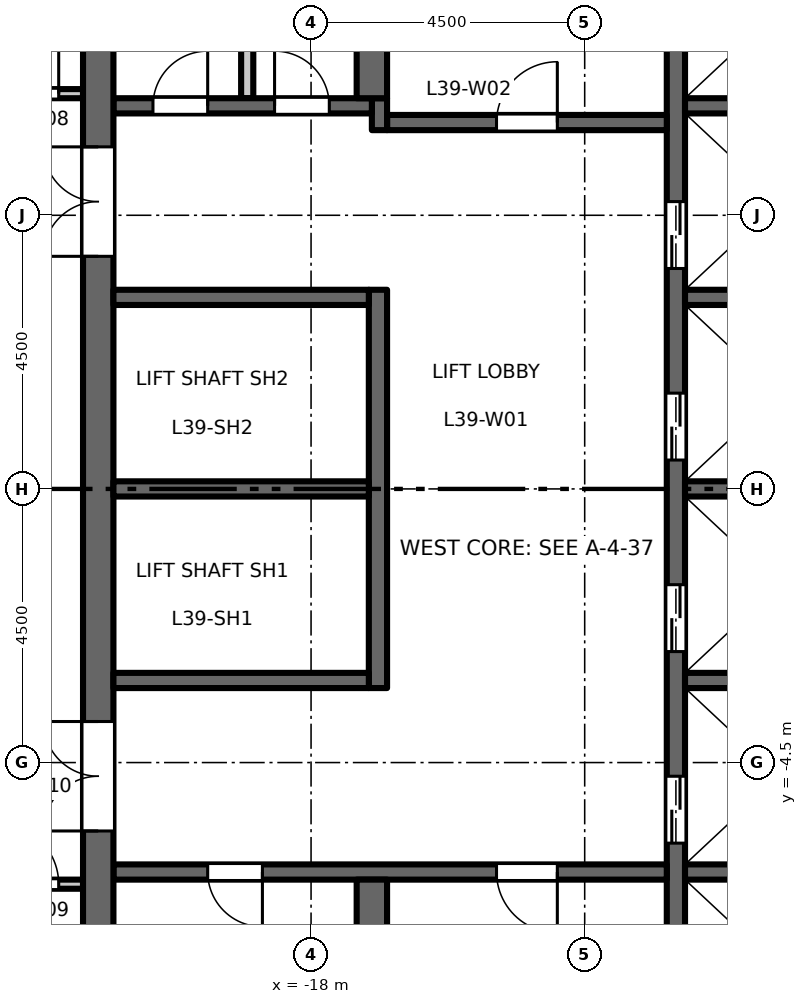
"""IFC4 building model, lengths in metres.
Left out: names, types, materials, properties, quantities, classifications, styles, units other than length and angle.
Written with IfcOpenShell. Run it as: python <this file> out.ifc"""

import sys

from ifc_helpers import new_model, si_unit, direction, frame, frame_2d, origin, place, context, subcontext, project, spatial, rectangle, extrude, element, fill, save


model = new_model("IFC4")
c1 = context("Model", 3, precision=1e-05, world=origin(), true_north=direction((0.0, 1.0)))
c2 = subcontext(c1, "Body", "Model", "MODEL_VIEW")
j1 = project(units=[si_unit("LENGTHUNIT", "METRE"), si_unit("PLANEANGLEUNIT", "RADIAN")], contexts=[c1])
p1 = place(None, origin())
s1 = spatial("IfcSite", under=j1, at=p1, CompositionType="ELEMENT")
p2 = place(p1, origin())
s2 = spatial("IfcBuilding", under=s1, at=p2, CompositionType="ELEMENT")
p3 = place(p2, frame((0.0, 0.0, 181.2)))
s3 = spatial("IfcBuildingStorey", under=s2, at=p3, CompositionType="ELEMENT", Elevation=181.2)
p4 = place(p3, frame((-12.0, -9.45, 0.0), z_axis=(0.0, 0.0, 1.0), x_axis=(0.0, 1.0, 0.0)))
e1 = element("IfcWall", 1, at=p4, inside=s3, PredefinedType="SHEAR", context=c2, shape_type="SweptSolid", body=[
    extrude(rectangle(XDim=18.9, YDim=0.3, at=frame_2d((9.45, 0.0))), origin(), (0.0, 0.0, 1.0), 5.8),
])
p5 = place(p4, frame((3.625, 0.0, 0.0)))
e2 = element("IfcOpeningElement", 2, at=p5, cuts=e1, PredefinedType="OPENING", context=c2, shape_type="SweptSolid", body=[
    extrude(rectangle(XDim=1.1, YDim=2.1, at=frame_2d((0.55, 1.05))), frame((0.0, 0.16, 0.0), z_axis=(0.0, -1.0, 0.0), x_axis=(1.0, 0.0, 0.0)), (0.0, 0.0, 1.0), 0.32),
])
p6 = place(p4, frame((6.775, 0.0, 0.0)))
e3 = element("IfcOpeningElement", 3, at=p6, cuts=e1, PredefinedType="OPENING", context=c2, shape_type="SweptSolid", body=[
    extrude(rectangle(XDim=1.1, YDim=2.1, at=frame_2d((0.55, 1.05))), frame((0.0, 0.16, 0.0), z_axis=(0.0, -1.0, 0.0), x_axis=(1.0, 0.0, 0.0)), (0.0, 0.0, 1.0), 0.32),
])
p7 = place(p4, frame((9.925, 0.0, 0.0)))
e4 = element("IfcOpeningElement", 4, at=p7, cuts=e1, PredefinedType="OPENING", context=c2, shape_type="SweptSolid", body=[
    extrude(rectangle(XDim=1.1, YDim=2.1, at=frame_2d((0.55, 1.05))), frame((0.0, 0.16, 0.0), z_axis=(0.0, -1.0, 0.0), x_axis=(1.0, 0.0, 0.0)), (0.0, 0.0, 1.0), 0.32),
])
p8 = place(p4, frame((13.075, 0.0, 0.0)))
e5 = element("IfcOpeningElement", 5, at=p8, cuts=e1, PredefinedType="OPENING", context=c2, shape_type="SweptSolid", body=[
    extrude(rectangle(XDim=1.1, YDim=2.1, at=frame_2d((0.55, 1.05))), frame((0.0, 0.16, 0.0), z_axis=(0.0, -1.0, 0.0), x_axis=(1.0, 0.0, 0.0)), (0.0, 0.0, 1.0), 0.32),
])
p9 = place(p4, frame((16.725, 0.0, 0.0)))
e6 = element("IfcOpeningElement", 6, at=p9, cuts=e1, PredefinedType="OPENING", context=c2, shape_type="SweptSolid", body=[
    extrude(rectangle(XDim=1.2, YDim=2.1, at=frame_2d((0.6, 1.05))), frame((0.0, 0.16, 0.0), z_axis=(0.0, -1.0, 0.0), x_axis=(1.0, 0.0, 0.0)), (0.0, 0.0, 1.0), 0.32),
])
p10 = place(p4, frame((0.975, 0.0, 0.0)))
e7 = element("IfcOpeningElement", 7, at=p10, cuts=e1, PredefinedType="OPENING", context=c2, shape_type="SweptSolid", body=[
    extrude(rectangle(XDim=1.2, YDim=2.1, at=frame_2d((0.6, 1.05))), frame((0.0, 0.16, 0.0), z_axis=(0.0, -1.0, 0.0), x_axis=(1.0, 0.0, 0.0)), (0.0, 0.0, 1.0), 0.32),
])
p11 = place(p3, frame((-12.15, 6.025, 0.0), z_axis=(0.0, 0.0, 1.0), x_axis=(-1.0, 0.0, 0.0)))
e8 = element("IfcWall", 8, at=p11, inside=s3, PredefinedType="SHEAR", context=c2, shape_type="SweptSolid", body=[
    extrude(rectangle(XDim=4.6, YDim=0.25, at=frame_2d((2.3, 0.0))), origin(), (0.0, 0.0, 1.0), 5.8),
])
p12 = place(p11, frame((1.8, 0.0, 0.0)))
e9 = element("IfcOpeningElement", 9, at=p12, cuts=e8, PredefinedType="OPENING", context=c2, shape_type="SweptSolid", body=[
    extrude(rectangle(XDim=1.0, YDim=2.1, at=frame_2d((0.5, 1.05))), frame((0.0, 0.135, 0.0), z_axis=(0.0, -1.0, 0.0), x_axis=(1.0, 0.0, 0.0)), (0.0, 0.0, 1.0), 0.27),
])
p13 = place(p3, frame((-16.875, 5.9, 0.0), z_axis=(0.0, 0.0, 1.0), x_axis=(0.0, 1.0, 0.0)))
e10 = element("IfcWall", 10, at=p13, inside=s3, PredefinedType="SHEAR", context=c2, shape_type="SweptSolid", body=[
    extrude(rectangle(XDim=0.525, YDim=0.25, at=frame_2d((0.263, 0.0))), origin(), (0.0, 0.0, 1.0), 5.8),
])
p14 = place(p3, frame((-17.0, 6.3, 0.0), z_axis=(0.0, 0.0, 1.0), x_axis=(-1.0, 0.0, 0.0)))
e11 = element("IfcWall", 11, at=p14, inside=s3, PredefinedType="SHEAR", context=c2, shape_type="SweptSolid", body=[
    extrude(rectangle(XDim=4.25, YDim=0.25, at=frame_2d((2.125, 0.0))), origin(), (0.0, 0.0, 1.0), 5.8),
])
p15 = place(p14, frame((0.7, 0.0, 0.0)))
e12 = element("IfcOpeningElement", 12, at=p15, cuts=e11, PredefinedType="OPENING", context=c2, shape_type="SweptSolid", body=[
    extrude(rectangle(XDim=0.9, YDim=2.1, at=frame_2d((0.45, 1.05))), frame((0.0, 0.135, 0.0), z_axis=(0.0, -1.0, 0.0), x_axis=(1.0, 0.0, 0.0)), (0.0, 0.0, 1.0), 0.27),
])
p16 = place(p14, frame((2.7, 0.0, 0.0)))
e13 = element("IfcOpeningElement", 13, at=p16, cuts=e11, PredefinedType="OPENING", context=c2, shape_type="SweptSolid", body=[
    extrude(rectangle(XDim=0.9, YDim=2.1, at=frame_2d((0.45, 1.05))), frame((0.0, 0.135, 0.0), z_axis=(0.0, -1.0, 0.0), x_axis=(1.0, 0.0, 0.0)), (0.0, 0.0, 1.0), 0.27),
])
p17 = place(p3, frame((-12.15, -6.3, 0.0), z_axis=(0.0, 0.0, 1.0), x_axis=(-1.0, 0.0, 0.0)))
e14 = element("IfcWall", 14, at=p17, inside=s3, PredefinedType="SHEAR", context=c2, shape_type="SweptSolid", body=[
    extrude(rectangle(XDim=9.1, YDim=0.25, at=frame_2d((4.55, 0.0))), origin(), (0.0, 0.0, 1.0), 5.8),
])
p18 = place(p17, frame((1.8, 0.0, 0.0)))
e15 = element("IfcOpeningElement", 15, at=p18, cuts=e14, PredefinedType="OPENING", context=c2, shape_type="SweptSolid", body=[
    extrude(rectangle(XDim=1.0, YDim=2.1, at=frame_2d((0.5, 1.05))), frame((0.0, 0.135, 0.0), z_axis=(0.0, -1.0, 0.0), x_axis=(1.0, 0.0, 0.0)), (0.0, 0.0, 1.0), 0.27),
])
p19 = place(p17, frame((6.65, 0.0, 0.0)))
e16 = element("IfcOpeningElement", 16, at=p19, cuts=e14, PredefinedType="OPENING", context=c2, shape_type="SweptSolid", body=[
    extrude(rectangle(XDim=0.9, YDim=2.1, at=frame_2d((0.45, 1.05))), frame((0.0, 0.135, 0.0), z_axis=(0.0, -1.0, 0.0), x_axis=(1.0, 0.0, 0.0)), (0.0, 0.0, 1.0), 0.27),
])
p20 = place(p3, frame((-21.5, -13.0, 0.0), z_axis=(0.0, 0.0, 1.0), x_axis=(0.0, 1.0, 0.0)))
e17 = element("IfcWall", 17, at=p20, inside=s3, PredefinedType="SHEAR", context=c2, shape_type="SweptSolid", body=[
    extrude(rectangle(XDim=26.0, YDim=0.5, at=frame_2d((13.0, 0.0))), origin(), (0.0, 0.0, 1.0), 5.8),
])
p21 = place(p20, frame((16.825, 0.0, 0.0)))
e18 = element("IfcOpeningElement", 18, at=p21, cuts=e17, PredefinedType="OPENING", context=c2, shape_type="SweptSolid", body=[
    extrude(rectangle(XDim=1.8, YDim=2.1, at=frame_2d((0.9, 1.05))), frame((0.0, 0.26, 0.0), z_axis=(0.0, -1.0, 0.0), x_axis=(1.0, 0.0, 0.0)), (0.0, 0.0, 1.0), 0.52),
])
p22 = place(p20, frame((7.375, 0.0, 0.0)))
e19 = element("IfcOpeningElement", 19, at=p22, cuts=e17, PredefinedType="OPENING", context=c2, shape_type="SweptSolid", body=[
    extrude(rectangle(XDim=1.8, YDim=2.1, at=frame_2d((0.9, 1.05))), frame((0.0, 0.26, 0.0), z_axis=(0.0, -1.0, 0.0), x_axis=(1.0, 0.0, 0.0)), (0.0, 0.0, 1.0), 0.52),
])
p23 = place(p3, frame((-19.05, 6.425, 0.0), z_axis=(0.0, 0.0, 1.0), x_axis=(0.0, 1.0, 0.0)))
e20 = element("IfcWall", 20, at=p23, inside=s3, PredefinedType="PARTITIONING", context=c2, shape_type="SweptSolid", body=[
    extrude(rectangle(XDim=6.575, YDim=0.2, at=frame_2d((3.288, 0.0))), origin(), (0.0, 0.0, 1.0), 5.8),
])
p24 = place(p3, frame((-16.9, -3.275, 0.0), z_axis=(0.0, 0.0, 1.0), x_axis=(0.0, 1.0, 0.0)))
e21 = element("IfcWall", 21, at=p24, inside=s3, PredefinedType="SHEAR", context=c2, shape_type="SweptSolid", body=[
    extrude(rectangle(XDim=6.55, YDim=0.3, at=frame_2d((3.275, 0.0))), origin(), (0.0, 0.0, 1.0), 5.8),
])
for number, where, z_axis, x_axis in (
    (22, (-17.05, 0.0, 0.0), (0.0, 0.0, 1.0), (-1.0, 0.0, 0.0)),
    (23, (-17.05, 3.15, 0.0), (0.0, 0.0, 1.0), (-1.0, 0.0, 0.0)),
    (24, (-17.05, -3.15, 0.0), (0.0, 0.0, 1.0), (-1.0, 0.0, 0.0)),
):
    element("IfcWall", number, at=place(p3, frame(where, z_axis=z_axis, x_axis=x_axis)), inside=s3, PredefinedType="SHEAR", context=c2, shape_type="SweptSolid", body=[
        extrude(rectangle(XDim=4.2, YDim=0.25, at=frame_2d((2.1, 0.0))), origin(), (0.0, 0.0, 1.0), 5.8),
    ])
for number, where, z_axis, x_axis in (
    (25, (-17.0, 6.425, 0.0), (0.0, 0.0, 1.0), (0.0, 1.0, 0.0)),
    (26, (-17.0, -13.0, 0.0), (0.0, 0.0, 1.0), (0.0, 1.0, 0.0)),
):
    element("IfcWall", number, at=place(p3, frame(where, z_axis=z_axis, x_axis=x_axis)), inside=s3, PredefinedType="SHEAR", context=c2, shape_type="SweptSolid", body=[
        extrude(rectangle(XDim=6.575, YDim=0.5, at=frame_2d((3.288, 0.0))), origin(), (0.0, 0.0, 1.0), 5.8),
    ])
for number, where, z_axis, x_axis in (
    (27, (-8.75, 0.0, 0.0), (0.0, 0.0, 1.0), (-1.0, 0.0, 0.0)),
    (28, (-8.75, 3.15, 0.0), (0.0, 0.0, 1.0), (-1.0, 0.0, 0.0)),
    (29, (-8.75, 6.3, 0.0), (0.0, 0.0, 1.0), (-1.0, 0.0, 0.0)),
    (30, (-8.75, -3.15, 0.0), (0.0, 0.0, 1.0), (-1.0, 0.0, 0.0)),
    (31, (-8.75, -6.3, 0.0), (0.0, 0.0, 1.0), (-1.0, 0.0, 0.0)),
):
    element("IfcWall", number, at=place(p3, frame(where, z_axis=z_axis, x_axis=x_axis)), inside=s3, PredefinedType="SHEAR", context=c2, shape_type="SweptSolid", body=[
        extrude(rectangle(XDim=3.1, YDim=0.25, at=frame_2d((1.55, 0.0))), origin(), (0.0, 0.0, 1.0), 5.8),
    ])
p25 = place(p3, frame((-26.325, -6.5, 0.0), z_axis=(0.0, 0.0, 1.0), x_axis=(1.0, 0.0, 0.0)))
e32 = element("IfcWall", 32, at=p25, inside=s3, PredefinedType="PARTITIONING", context=c2, shape_type="SweptSolid", body=[
    extrude(rectangle(XDim=4.575, YDim=0.15, at=frame_2d((2.288, 0.0))), origin(), (0.0, 0.0, 1.0), 5.8),
])
p26 = place(p25, frame((3.175, 0.0, 0.0)))
e33 = element("IfcOpeningElement", 33, at=p26, cuts=e32, PredefinedType="OPENING", context=c2, shape_type="SweptSolid", body=[
    extrude(rectangle(XDim=1.0, YDim=2.1, at=frame_2d((0.5, 1.05))), frame((0.0, 0.085, 0.0), z_axis=(0.0, -1.0, 0.0), x_axis=(1.0, 0.0, 0.0)), (0.0, 0.0, 1.0), 0.17),
])
p27 = place(p3, frame((-26.325, 6.5, 0.0), z_axis=(0.0, 0.0, 1.0), x_axis=(1.0, 0.0, 0.0)))
e34 = element("IfcWall", 34, at=p27, inside=s3, PredefinedType="PARTITIONING", context=c2, shape_type="SweptSolid", body=[
    extrude(rectangle(XDim=4.575, YDim=0.15, at=frame_2d((2.288, 0.0))), origin(), (0.0, 0.0, 1.0), 5.8),
])
p28 = place(p27, frame((3.175, 0.0, 0.0)))
e35 = element("IfcOpeningElement", 35, at=p28, cuts=e34, PredefinedType="OPENING", context=c2, shape_type="SweptSolid", body=[
    extrude(rectangle(XDim=1.0, YDim=2.1, at=frame_2d((0.5, 1.05))), frame((0.0, 0.085, 0.0), z_axis=(0.0, -1.0, 0.0), x_axis=(1.0, 0.0, 0.0)), (0.0, 0.0, 1.0), 0.17),
])
p29 = place(p12, origin())
e36 = element("IfcDoor", 36, at=p29, inside=s3, OperationType="SINGLE_SWING_LEFT", PredefinedType="DOOR", context=c2, shape_type="SweptSolid", body=[
    extrude(rectangle(XDim=1.0, YDim=2.1, at=frame_2d((0.5, 1.05))), frame((0.0, 0.025, 0.0), z_axis=(0.0, -1.0, 0.0), x_axis=(1.0, 0.0, 0.0)), (0.0, 0.0, 1.0), 0.05),
])
fill(e9, e36)
p30 = place(p18, origin())
e37 = element("IfcDoor", 37, at=p30, inside=s3, OperationType="SINGLE_SWING_RIGHT", PredefinedType="DOOR", context=c2, shape_type="SweptSolid", body=[
    extrude(rectangle(XDim=1.0, YDim=2.1, at=frame_2d((0.5, 1.05))), frame((0.0, 0.025, 0.0), z_axis=(0.0, -1.0, 0.0), x_axis=(1.0, 0.0, 0.0)), (0.0, 0.0, 1.0), 0.05),
])
fill(e15, e37)
p31 = place(p21, origin())
e38 = element("IfcDoor", 38, at=p31, inside=s3, OperationType="DOUBLE_DOOR_DOUBLE_SWING", PredefinedType="DOOR", context=c2, shape_type="SweptSolid", body=[
    extrude(rectangle(XDim=1.8, YDim=2.1, at=frame_2d((0.9, 1.05))), frame((0.0, 0.025, 0.0), z_axis=(0.0, -1.0, 0.0), x_axis=(1.0, 0.0, 0.0)), (0.0, 0.0, 1.0), 0.05),
])
fill(e18, e38)
p32 = place(p22, origin())
e39 = element("IfcDoor", 39, at=p32, inside=s3, OperationType="DOUBLE_DOOR_DOUBLE_SWING", PredefinedType="DOOR", context=c2, shape_type="SweptSolid", body=[
    extrude(rectangle(XDim=1.8, YDim=2.1, at=frame_2d((0.9, 1.05))), frame((0.0, 0.025, 0.0), z_axis=(0.0, -1.0, 0.0), x_axis=(1.0, 0.0, 0.0)), (0.0, 0.0, 1.0), 0.05),
])
fill(e19, e39)
p33 = place(p5, origin())
e40 = element("IfcDoor", 40, at=p33, inside=s3, OperationType="DOUBLE_DOOR_SLIDING", PredefinedType="DOOR", context=c2, shape_type="SweptSolid", body=[
    extrude(rectangle(XDim=1.1, YDim=2.1, at=frame_2d((0.55, 1.05))), frame((0.0, 0.025, 0.0), z_axis=(0.0, -1.0, 0.0), x_axis=(1.0, 0.0, 0.0)), (0.0, 0.0, 1.0), 0.05),
])
fill(e2, e40)
p34 = place(p6, origin())
e41 = element("IfcDoor", 41, at=p34, inside=s3, OperationType="DOUBLE_DOOR_SLIDING", PredefinedType="DOOR", context=c2, shape_type="SweptSolid", body=[
    extrude(rectangle(XDim=1.1, YDim=2.1, at=frame_2d((0.55, 1.05))), frame((0.0, 0.025, 0.0), z_axis=(0.0, -1.0, 0.0), x_axis=(1.0, 0.0, 0.0)), (0.0, 0.0, 1.0), 0.05),
])
fill(e3, e41)
p35 = place(p7, origin())
e42 = element("IfcDoor", 42, at=p35, inside=s3, OperationType="DOUBLE_DOOR_SLIDING", PredefinedType="DOOR", context=c2, shape_type="SweptSolid", body=[
    extrude(rectangle(XDim=1.1, YDim=2.1, at=frame_2d((0.55, 1.05))), frame((0.0, 0.025, 0.0), z_axis=(0.0, -1.0, 0.0), x_axis=(1.0, 0.0, 0.0)), (0.0, 0.0, 1.0), 0.05),
])
fill(e4, e42)
p36 = place(p8, origin())
e43 = element("IfcDoor", 43, at=p36, inside=s3, OperationType="DOUBLE_DOOR_SLIDING", PredefinedType="DOOR", context=c2, shape_type="SweptSolid", body=[
    extrude(rectangle(XDim=1.1, YDim=2.1, at=frame_2d((0.55, 1.05))), frame((0.0, 0.025, 0.0), z_axis=(0.0, -1.0, 0.0), x_axis=(1.0, 0.0, 0.0)), (0.0, 0.0, 1.0), 0.05),
])
fill(e5, e43)
p37 = place(p15, origin())
e44 = element("IfcDoor", 44, at=p37, inside=s3, OperationType="SINGLE_SWING_RIGHT", PredefinedType="DOOR", context=c2, shape_type="SweptSolid", body=[
    extrude(rectangle(XDim=0.9, YDim=2.1, at=frame_2d((0.45, 1.05))), frame((0.0, 0.025, 0.0), z_axis=(0.0, -1.0, 0.0), x_axis=(1.0, 0.0, 0.0)), (0.0, 0.0, 1.0), 0.05),
])
fill(e12, e44)
p38 = place(p16, origin())
e45 = element("IfcDoor", 45, at=p38, inside=s3, OperationType="SINGLE_SWING_LEFT", PredefinedType="DOOR", context=c2, shape_type="SweptSolid", body=[
    extrude(rectangle(XDim=0.9, YDim=2.1, at=frame_2d((0.45, 1.05))), frame((0.0, 0.025, 0.0), z_axis=(0.0, -1.0, 0.0), x_axis=(1.0, 0.0, 0.0)), (0.0, 0.0, 1.0), 0.05),
])
fill(e13, e45)
p39 = place(p19, origin())
e46 = element("IfcDoor", 46, at=p39, inside=s3, OperationType="SINGLE_SWING_RIGHT", PredefinedType="DOOR", context=c2, shape_type="SweptSolid", body=[
    extrude(rectangle(XDim=0.9, YDim=2.1, at=frame_2d((0.45, 1.05))), frame((0.0, 0.025, 0.0), z_axis=(0.0, -1.0, 0.0), x_axis=(1.0, 0.0, 0.0)), (0.0, 0.0, 1.0), 0.05),
])
fill(e16, e46)
p40 = place(p28, origin())
e47 = element("IfcDoor", 47, at=p40, inside=s3, OperationType="SINGLE_SWING_RIGHT", PredefinedType="DOOR", context=c2, shape_type="SweptSolid", body=[
    extrude(rectangle(XDim=1.0, YDim=2.1, at=frame_2d((0.5, 1.05))), frame((0.0, 0.025, 0.0), z_axis=(0.0, -1.0, 0.0), x_axis=(1.0, 0.0, 0.0)), (0.0, 0.0, 1.0), 0.05),
])
fill(e35, e47)
p41 = place(p26, origin())
e48 = element("IfcDoor", 48, at=p41, inside=s3, OperationType="SINGLE_SWING_LEFT", PredefinedType="DOOR", context=c2, shape_type="SweptSolid", body=[
    extrude(rectangle(XDim=1.0, YDim=2.1, at=frame_2d((0.5, 1.05))), frame((0.0, 0.025, 0.0), z_axis=(0.0, -1.0, 0.0), x_axis=(1.0, 0.0, 0.0)), (0.0, 0.0, 1.0), 0.05),
])
fill(e33, e48)
save(model, sys.argv[1])
